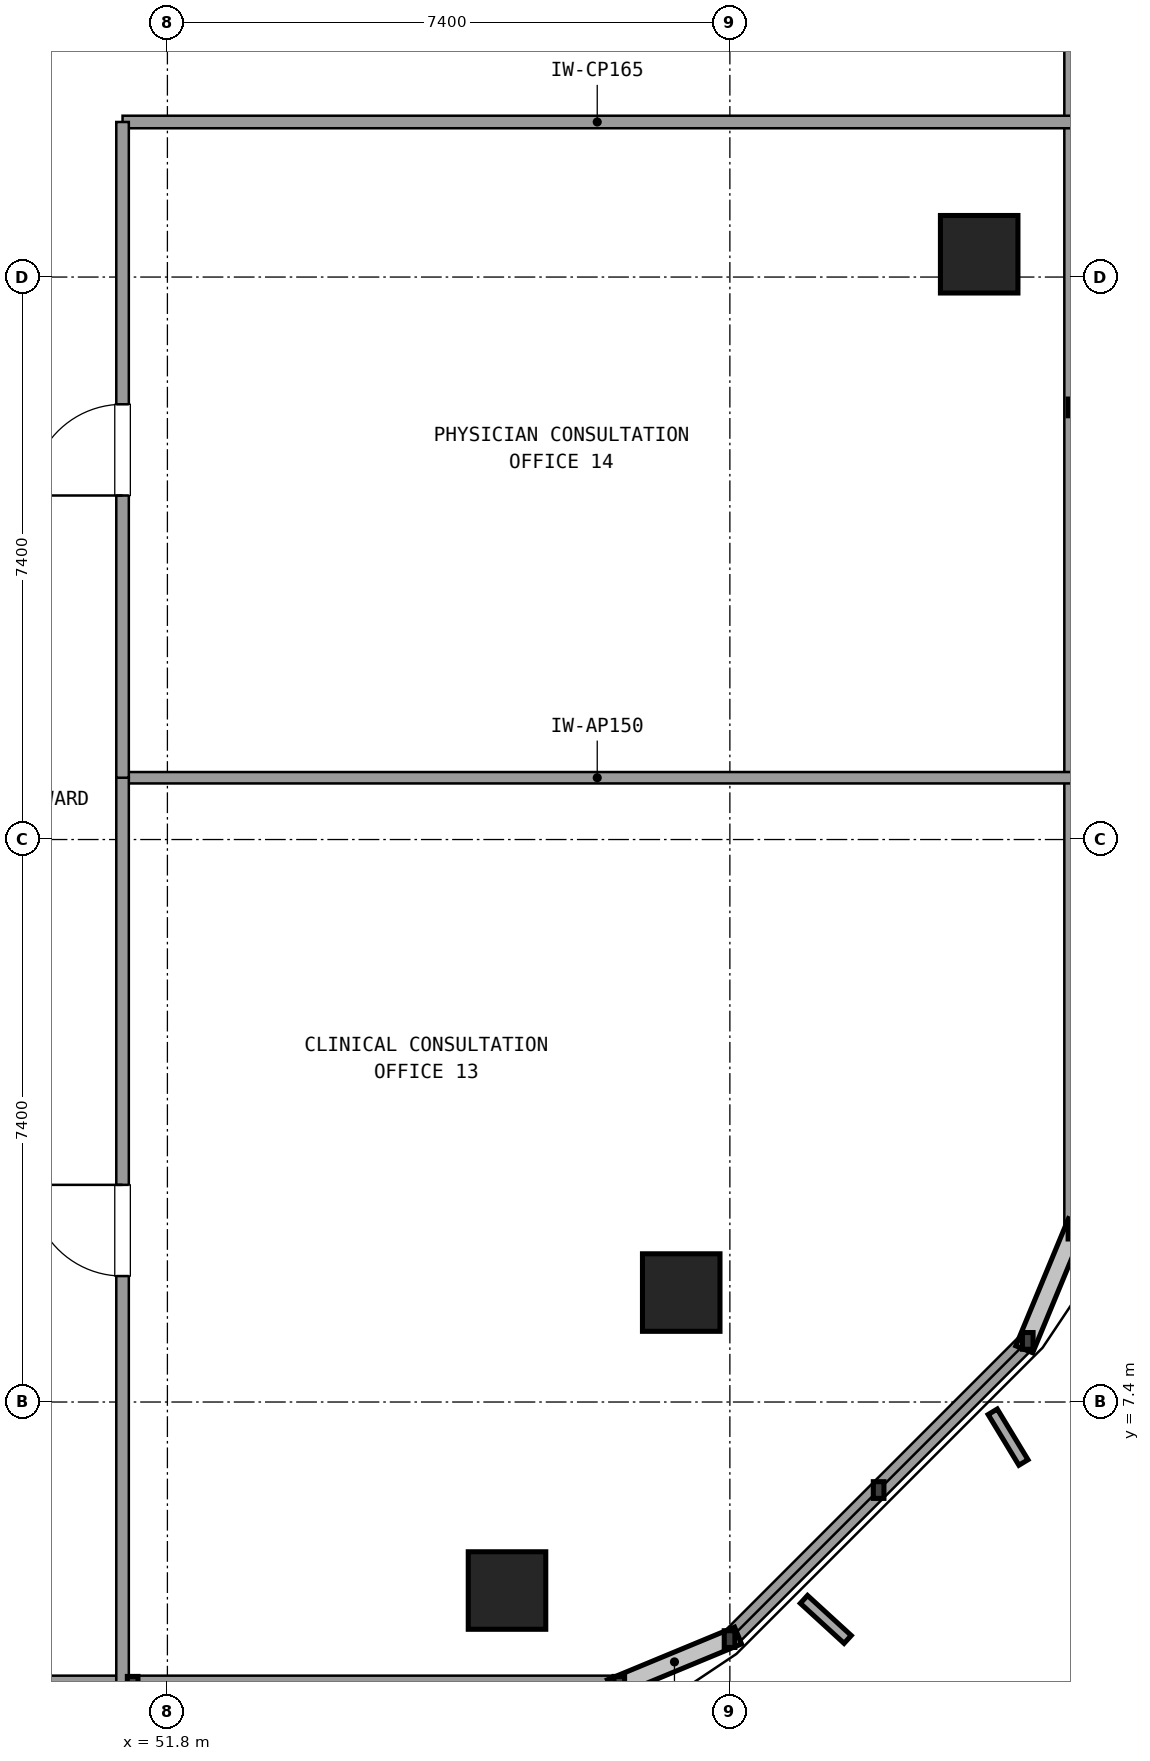
"""IFC4 building model, lengths in metres.
Left out: names, types, materials, properties, quantities, classifications, styles, units other than length and angle.
Written with IfcOpenShell. Run it as: python <this file> out.ifc"""

import sys

from ifc_helpers import new_model, si_unit, direction, frame, frame_2d, origin, origin_2d, place, context, subcontext, project, spatial, rectangle, extrude, element, fill, save


model = new_model("IFC4")
c1 = context("Model", 3, precision=1e-05, world=origin(), true_north=direction((0.0, 1.0)))
c2 = subcontext(c1, "Body", "Model", "MODEL_VIEW")
j1 = project(units=[si_unit("LENGTHUNIT", "METRE"), si_unit("PLANEANGLEUNIT", "RADIAN")], contexts=[c1])
p1 = place(None, origin())
s1 = spatial("IfcSite", under=j1, at=p1, CompositionType="ELEMENT")
p2 = place(p1, origin())
s2 = spatial("IfcBuilding", under=s1, at=p2, CompositionType="ELEMENT")
p3 = place(p2, frame((0.0, 0.0, 84.78)))
s3 = spatial("IfcBuildingStorey", under=s2, at=p3, CompositionType="ELEMENT", Elevation=84.78)
for number, where, z_axis, x_axis in (
    (1, (56.268, 4.92, 0.0), (0.0, 0.0, 1.0), (1.0, 0.0, 0.0)),
    (2, (58.56, 8.84, 0.0), (0.0, 0.0, 1.0), (1.0, 0.0, 0.0)),
):
    element("IfcColumn", number, at=place(p3, frame(where, z_axis=z_axis, x_axis=x_axis)), inside=s3, PredefinedType="COLUMN", context=c2, shape_type="SweptSolid", body=[
        extrude(rectangle(XDim=1.02, YDim=1.02, at=origin_2d()), origin(), (0.0, 0.0, 1.0), 3.577),
    ])
p4 = place(p3, frame((62.48, 22.5, 0.0), z_axis=(0.0, 0.0, 1.0), x_axis=(1.0, 0.0, 0.0)))
e3 = element("IfcColumn", 3, at=p4, inside=s3, PredefinedType="COLUMN", context=c2, shape_type="SweptSolid", body=[
    extrude(rectangle(XDim=1.02, YDim=1.02, at=origin_2d()), origin(), (0.0, 0.0, 1.0), 3.578),
])
p5 = place(p3, frame((38.539, 3.68, 0.0), z_axis=(0.0, 0.0, 1.0), x_axis=(1.0, 0.0, 0.0)))
e4 = element("IfcWall", 4, at=p5, inside=s3, PredefinedType="SOLIDWALL", context=c2, shape_type="SweptSolid", body=[
    extrude(rectangle(XDim=19.206, YDim=0.24, at=frame_2d((9.603, 0.0))), origin(), (0.0, 0.0, 1.0), 0.85),
])
p6 = place(p3, frame((59.196, 4.281, 0.0), z_axis=(0.0, 0.0, 1.0), x_axis=(0.707084777957, 0.707128783731, 0.0)))
e5 = element("IfcWall", 5, at=p6, inside=s3, PredefinedType="SOLIDWALL", context=c2, shape_type="SweptSolid", body=[
    extrude(rectangle(XDim=5.548, YDim=0.24, at=frame_2d((2.774, 0.0))), origin(), (0.0, 0.0, 1.0), 0.85),
])
p7 = place(p3, frame((63.72, 9.655, 0.0), z_axis=(0.0, 0.0, 1.0), x_axis=(0.0, 1.0, 0.0)))
e6 = element("IfcWall", 6, at=p7, inside=s3, PredefinedType="SOLIDWALL", context=c2, shape_type="SweptSolid", body=[
    extrude(rectangle(XDim=32.49, YDim=0.24, at=frame_2d((16.245, 0.0))), origin(), (0.0, 0.0, 1.0), 0.85),
])
p8 = place(p3, frame((51.21, 24.24, 0.0), z_axis=(0.0, 0.0, 1.0), x_axis=(1.0, 0.0, 0.0)))
e7 = element("IfcWall", 7, at=p8, inside=s3, PredefinedType="PARTITIONING", context=c2, shape_type="SweptSolid", body=[
    extrude(rectangle(XDim=12.49, YDim=0.165, at=frame_2d((6.245, 0.0))), origin(), (0.0, 0.0, 1.0), 2.61),
])
p9 = place(p3, frame((51.21, 15.613, 0.0), z_axis=(0.0, 0.0, 1.0), x_axis=(1.0, 0.0, 0.0)))
e8 = element("IfcWall", 8, at=p9, inside=s3, PredefinedType="PARTITIONING", context=c2, shape_type="SweptSolid", body=[
    extrude(rectangle(XDim=12.49, YDim=0.15, at=frame_2d((6.245, 0.0))), origin(), (0.0, 0.0, 1.0), 2.61),
])
p10 = place(p3, frame((51.21, 3.7, 0.0), z_axis=(0.0, 0.0, 1.0), x_axis=(0.0, 1.0, 0.0)))
e9 = element("IfcWall", 9, at=p10, inside=s3, PredefinedType="PARTITIONING", context=c2, shape_type="SweptSolid", body=[
    extrude(rectangle(XDim=11.913, YDim=0.165, at=frame_2d((5.957, 0.0))), origin(), (0.0, 0.0, 1.0), 2.61),
])
p11 = place(p10, frame((5.357, 0.0, 0.0)))
e10 = element("IfcOpeningElement", 10, at=p11, cuts=e9, PredefinedType="OPENING", context=c2, shape_type="SweptSolid", body=[
    extrude(rectangle(XDim=1.2, YDim=2.15, at=frame_2d((0.6, 1.075))), frame((0.0, 0.093, 0.0), z_axis=(0.0, -1.0, 0.0), x_axis=(1.0, 0.0, 0.0)), (0.0, 0.0, 1.0), 0.185),
])
p12 = place(p3, frame((51.21, 15.613, 0.0), z_axis=(0.0, 0.0, 1.0), x_axis=(0.0, 1.0, 0.0)))
e11 = element("IfcWall", 11, at=p12, inside=s3, PredefinedType="PARTITIONING", context=c2, shape_type="SweptSolid", body=[
    extrude(rectangle(XDim=8.627, YDim=0.165, at=frame_2d((4.313, 0.0))), origin(), (0.0, 0.0, 1.0), 2.61),
])
p13 = place(p12, frame((3.713, 0.0, 0.0)))
e12 = element("IfcOpeningElement", 12, at=p13, cuts=e11, PredefinedType="OPENING", context=c2, shape_type="SweptSolid", body=[
    extrude(rectangle(XDim=1.2, YDim=2.15, at=frame_2d((0.6, 1.075))), frame((0.0, 0.093, 0.0), z_axis=(0.0, -1.0, 0.0), x_axis=(1.0, 0.0, 0.0)), (0.0, 0.0, 1.0), 0.185),
])
p14 = place(p11, origin())
e13 = element("IfcDoor", 13, at=p14, inside=s3, OperationType="SINGLE_SWING_RIGHT", PredefinedType="DOOR", context=c2, shape_type="SweptSolid", body=[
    extrude(rectangle(XDim=1.2, YDim=2.15, at=frame_2d((0.6, 1.075))), frame((0.0, 0.025, 0.0), z_axis=(0.0, -1.0, 0.0), x_axis=(1.0, 0.0, 0.0)), (0.0, 0.0, 1.0), 0.05),
])
fill(e10, e13)
p15 = place(p13, origin())
e14 = element("IfcDoor", 14, at=p15, inside=s3, OperationType="SINGLE_SWING_LEFT", PredefinedType="DOOR", context=c2, shape_type="SweptSolid", body=[
    extrude(rectangle(XDim=1.2, YDim=2.15, at=frame_2d((0.6, 1.075))), frame((0.0, 0.025, 0.0), z_axis=(0.0, -1.0, 0.0), x_axis=(1.0, 0.0, 0.0)), (0.0, 0.0, 1.0), 0.05),
])
fill(e12, e14)
save(model, sys.argv[1])
